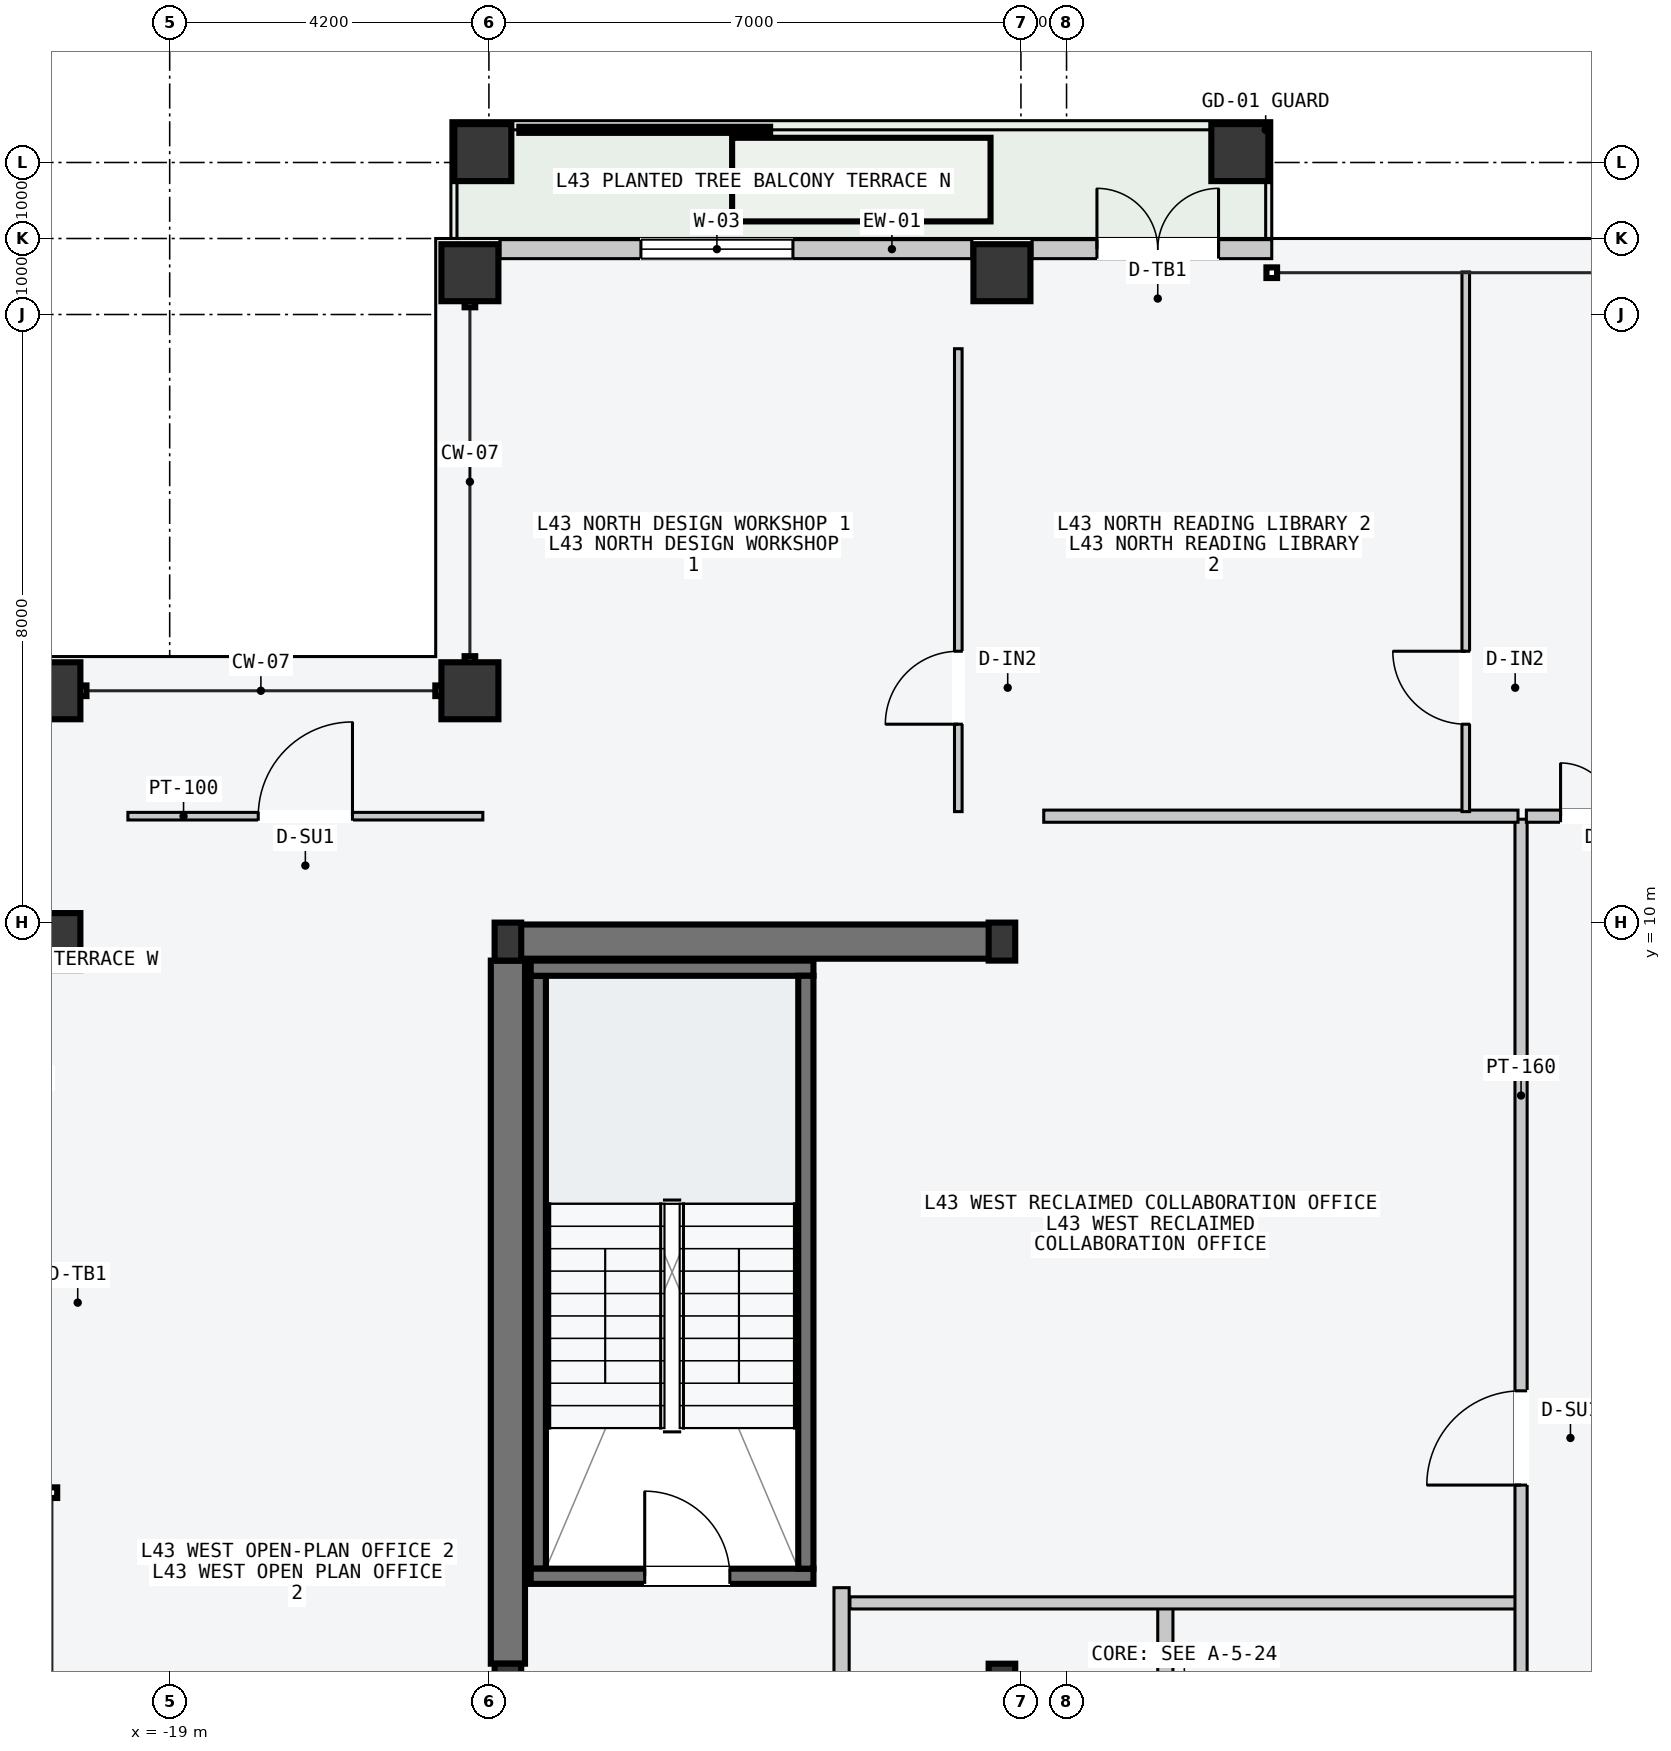
"""IFC4 building model, lengths in metres.
Left out: names, types, materials, properties, quantities, classifications, styles, units other than length and angle.
Written with IfcOpenShell. Run it as: python <this file> out.ifc"""

import sys

from ifc_helpers import new_model, si_unit, direction, frame, frame_2d, origin, origin_2d, place, context, subcontext, project, spatial, rectangle, hollow_rectangle, i_section, extrude, element, fill, save


model = new_model("IFC4")
c1 = context("Model", 3, precision=1e-05, world=origin(), true_north=direction((0.0, 1.0)))
c2 = subcontext(c1, "Body", "Model", "MODEL_VIEW")
j1 = project(units=[si_unit("LENGTHUNIT", "METRE"), si_unit("PLANEANGLEUNIT", "RADIAN")], contexts=[c1])
p1 = place(None, origin())
s1 = spatial("IfcSite", under=j1, at=p1, CompositionType="ELEMENT")
p2 = place(p1, origin())
s2 = spatial("IfcBuilding", under=s1, at=p2, CompositionType="ELEMENT")
p3 = place(p2, frame((0.0, 0.0, 165.9)))
s3 = spatial("IfcBuildingStorey", under=s2, at=p3, CompositionType="ELEMENT", Elevation=165.9)
p4 = place(p3, frame((-14.53, 9.75, -0.2), z_axis=(0.0, 0.0, 1.0), x_axis=(1.0, 0.0, 0.0)))
e1 = element("IfcWall", 1, at=p4, inside=s3, PredefinedType="SHEAR", context=c2, shape_type="SweptSolid", body=[
    extrude(rectangle(XDim=6.46, YDim=0.45, at=frame_2d((3.23, 0.0))), origin(), (0.0, 0.0, 1.0), 3.6),
])
p5 = place(p3, frame((-14.55, 0.25, -0.2), z_axis=(0.0, 0.0, 1.0), x_axis=(0.0, 1.0, 0.0)))
e2 = element("IfcWall", 2, at=p5, inside=s3, PredefinedType="SHEAR", context=c2, shape_type="SweptSolid", body=[
    extrude(rectangle(XDim=9.25, YDim=0.45, at=frame_2d((4.625, 0.0))), origin(), (0.0, 0.0, 1.0), 3.6),
])
p6 = place(p3, frame((-14.15, 1.5, -0.2), z_axis=(0.0, 0.0, 1.0), x_axis=(0.0, 1.0, 0.0)))
e3 = element("IfcWall", 3, at=p6, inside=s3, PredefinedType="SOLIDWALL", context=c2, shape_type="SweptSolid", body=[
    extrude(rectangle(XDim=7.8, YDim=0.2, at=frame_2d((3.9, 0.0))), origin(), (0.0, 0.0, 1.0), 3.6),
])
p7 = place(p3, frame((-14.25, 1.4, -0.2), z_axis=(0.0, 0.0, 1.0), x_axis=(1.0, 0.0, 0.0)))
e4 = element("IfcWall", 4, at=p7, inside=s3, PredefinedType="SOLIDWALL", context=c2, shape_type="SweptSolid", body=[
    extrude(rectangle(XDim=3.72, YDim=0.2, at=frame_2d((1.86, 0.0))), origin(), (0.0, 0.0, 1.0), 3.6),
])
p8 = place(p7, frame((1.5, 0.0, 0.2)))
e5 = element("IfcOpeningElement", 5, at=p8, cuts=e4, PredefinedType="OPENING", context=c2, shape_type="SweptSolid", body=[
    extrude(rectangle(XDim=1.12, YDim=2.18, at=frame_2d((0.56, 1.09))), frame((0.0, 0.11, 0.0), z_axis=(0.0, -1.0, 0.0), x_axis=(1.0, 0.0, 0.0)), (0.0, 0.0, 1.0), 0.22),
])
p9 = place(p3, frame((-14.25, 9.4, -0.2), z_axis=(0.0, 0.0, 1.0), x_axis=(1.0, 0.0, 0.0)))
e6 = element("IfcWall", 6, at=p9, inside=s3, PredefinedType="SOLIDWALL", context=c2, shape_type="SweptSolid", body=[
    extrude(rectangle(XDim=3.72, YDim=0.2, at=frame_2d((1.86, 0.0))), origin(), (0.0, 0.0, 1.0), 3.6),
])
p10 = place(p3, frame((-10.63, 1.5, -0.2), z_axis=(0.0, 0.0, 1.0), x_axis=(0.0, 1.0, 0.0)))
e7 = element("IfcWall", 7, at=p10, inside=s3, PredefinedType="SOLIDWALL", context=c2, shape_type="SweptSolid", body=[
    extrude(rectangle(XDim=7.8, YDim=0.2, at=frame_2d((3.9, 0.0))), origin(), (0.0, 0.0, 1.0), 3.6),
])
for number, where, z_axis, x_axis in (
    (8, (-14.55, 0.0, 0.0), (0.0, 0.0, 1.0), (1.0, 0.0, 0.0)),
    (9, (-14.55, 9.75, 0.0), (0.0, 0.0, 1.0), (1.0, 0.0, 0.0)),
    (10, (-8.05, 0.0, 0.0), (0.0, 0.0, 1.0), (1.0, 0.0, 0.0)),
    (11, (-8.05, 9.75, 0.0), (0.0, 0.0, 1.0), (1.0, 0.0, 0.0)),
):
    element("IfcColumn", number, at=place(p3, frame(where, z_axis=z_axis, x_axis=x_axis)), inside=s3, PredefinedType="COLUMN", context=c2, shape_type="SweptSolid", body=[
        extrude(i_section(OverallWidth=0.35, OverallDepth=0.5, WebThickness=0.02, FlangeThickness=0.032, at=origin_2d()), origin(), (0.0, 0.0, 1.0), 3.6),
    ])
for number, where, z_axis, x_axis in (
    (12, (-15.05, 18.55, 0.0), (0.0, 0.0, 1.0), (1.0, 0.0, 0.0)),
    (13, (-8.05, 18.55, 0.0), (0.0, 0.0, 1.0), (1.0, 0.0, 0.0)),
    (14, (-20.55, 9.75, 0.0), (0.0, 0.0, 1.0), (0.0, 1.0, 0.0)),
    (15, (-20.55, 13.05, 0.0), (0.0, 0.0, 1.0), (0.0, 1.0, 0.0)),
    (16, (-15.05, 13.05, 0.0), (0.0, 0.0, 1.0), (1.0, 0.0, 0.0)),
    (17, (-14.88, 20.13, 0.0), (0.0, 0.0, 1.0), (1.0, 0.0, 0.0)),
    (18, (-4.92, 20.13, 0.0), (0.0, 0.0, 1.0), (1.0, 0.0, 0.0)),
):
    element("IfcColumn", number, at=place(p3, frame(where, z_axis=z_axis, x_axis=x_axis)), inside=s3, PredefinedType="COLUMN", context=c2, shape_type="SweptSolid", body=[
        extrude(hollow_rectangle(XDim=0.75, YDim=0.75, WallThickness=0.032, at=origin_2d()), origin(), (0.0, 0.0, 1.0), 3.6),
    ])
p11 = place(p3, frame((-14.655, 18.86, 0.0), z_axis=(0.0, 0.0, 1.0), x_axis=(1.0, 0.0, 0.0)))
e19 = element("IfcWall", 19, at=p11, inside=s3, PredefinedType="STANDARD", context=c2, shape_type="SweptSolid", body=[
    extrude(rectangle(XDim=6.21, YDim=0.25, at=frame_2d((3.105, 0.0))), origin(), (0.0, 0.0, 1.0), 3.4),
])
p12 = place(p11, frame((1.855, 0.0, 0.85)))
e20 = element("IfcOpeningElement", 20, at=p12, cuts=e19, PredefinedType="OPENING", context=c2, shape_type="SweptSolid", body=[
    extrude(rectangle(XDim=2.0, YDim=2.1, at=frame_2d((1.0, 1.05))), frame((0.0, 0.135, 0.0), z_axis=(0.0, -1.0, 0.0), x_axis=(1.0, 0.0, 0.0)), (0.0, 0.0, 1.0), 0.27),
])
p13 = place(p3, frame((-7.655, 18.86, 0.0), z_axis=(0.0, 0.0, 1.0), x_axis=(1.0, 0.0, 0.0)))
e21 = element("IfcWall", 21, at=p13, inside=s3, PredefinedType="STANDARD", context=c2, shape_type="SweptSolid", body=[
    extrude(rectangle(XDim=3.155, YDim=0.25, at=frame_2d((1.578, 0.0))), origin(), (0.0, 0.0, 1.0), 3.4),
])
p14 = place(p13, frame((0.855, 0.0, 0.0)))
e22 = element("IfcOpeningElement", 22, at=p14, cuts=e21, PredefinedType="OPENING", context=c2, shape_type="SweptSolid", body=[
    extrude(rectangle(XDim=1.6, YDim=2.2, at=frame_2d((0.8, 1.1))), frame((0.0, 0.135, 0.0), z_axis=(0.0, -1.0, 0.0), x_axis=(1.0, 0.0, 0.0)), (0.0, 0.0, 1.0), 0.27),
])
p15 = place(p3, frame((-5.9, -9.45, 0.0), z_axis=(0.0, 0.0, 1.0), x_axis=(0.0, 1.0, 0.0)))
e23 = element("IfcWall", 23, at=p15, inside=s3, PredefinedType="PARTITIONING", context=c2, shape_type="SweptSolid", body=[
    extrude(rectangle(XDim=10.5, YDim=0.2, at=frame_2d((5.25, 0.0))), origin(), (0.0, 0.0, 1.0), 3.4),
])
p16 = place(p15, frame((3.9, 0.0, 0.0)))
e24 = element("IfcOpeningElement", 24, at=p16, cuts=e23, PredefinedType="OPENING", context=c2, shape_type="SweptSolid", body=[
    extrude(rectangle(XDim=1.5, YDim=2.2, at=frame_2d((0.75, 1.1))), frame((0.0, 0.11, 0.0), z_axis=(0.0, -1.0, 0.0), x_axis=(1.0, 0.0, 0.0)), (0.0, 0.0, 1.0), 0.22),
])
p17 = place(p3, frame((-10.16, -2.55, 0.0), z_axis=(0.0, 0.0, 1.0), x_axis=(0.0, 1.0, 0.0)))
e25 = element("IfcWall", 25, at=p17, inside=s3, PredefinedType="PARTITIONING", context=c2, shape_type="SweptSolid", body=[
    extrude(rectangle(XDim=3.8, YDim=0.2, at=frame_2d((1.9, 0.0))), origin(), (0.0, 0.0, 1.0), 3.4),
])
p18 = place(p17, frame((1.3, 0.0, 0.0)))
e26 = element("IfcOpeningElement", 26, at=p18, cuts=e25, PredefinedType="OPENING", context=c2, shape_type="SweptSolid", body=[
    extrude(rectangle(XDim=1.1, YDim=2.15, at=frame_2d((0.55, 1.075))), frame((0.0, 0.11, 0.0), z_axis=(0.0, -1.0, 0.0), x_axis=(1.0, 0.0, 0.0)), (0.0, 0.0, 1.0), 0.22),
])
p19 = place(p3, frame((-10.05, 1.05, 0.0), z_axis=(0.0, 0.0, 1.0), x_axis=(1.0, 0.0, 0.0)))
e27 = element("IfcWall", 27, at=p19, inside=s3, PredefinedType="PARTITIONING", context=c2, shape_type="SweptSolid", body=[
    extrude(rectangle(XDim=8.79, YDim=0.16, at=frame_2d((4.395, 0.0))), origin(), (0.0, 0.0, 1.0), 3.4),
])
p20 = place(p3, frame((-1.22, -3.5, 0.0), z_axis=(0.0, 0.0, 1.0), x_axis=(0.0, 1.0, 0.0)))
e28 = element("IfcWall", 28, at=p20, inside=s3, PredefinedType="PARTITIONING", context=c2, shape_type="SweptSolid", body=[
    extrude(rectangle(XDim=14.86, YDim=0.16, at=frame_2d((7.43, 0.0))), origin(), (0.0, 0.0, 1.0), 3.4),
])
p21 = place(p20, frame((6.1, 0.0, 0.0)))
e29 = element("IfcOpeningElement", 29, at=p21, cuts=e28, PredefinedType="OPENING", context=c2, shape_type="SweptSolid", body=[
    extrude(rectangle(XDim=1.24, YDim=2.24, at=frame_2d((0.62, 1.12))), frame((0.0, 0.09, 0.0), z_axis=(0.0, -1.0, 0.0), x_axis=(1.0, 0.0, 0.0)), (0.0, 0.0, 1.0), 0.18),
])
p22 = place(p20, frame((1.6, 0.0, 0.0)))
e30 = element("IfcOpeningElement", 30, at=p22, cuts=e28, PredefinedType="OPENING", context=c2, shape_type="SweptSolid", body=[
    extrude(rectangle(XDim=0.96, YDim=2.18, at=frame_2d((0.48, 1.09))), frame((0.0, 0.09, 0.0), z_axis=(0.0, -1.0, 0.0), x_axis=(1.0, 0.0, 0.0)), (0.0, 0.0, 1.0), 0.18),
])
p23 = place(p3, frame((-7.5, 11.4, 0.0), z_axis=(0.0, 0.0, 1.0), x_axis=(1.0, 0.0, 0.0)))
e31 = element("IfcWall", 31, at=p23, inside=s3, PredefinedType="PARTITIONING", context=c2, shape_type="SweptSolid", body=[
    extrude(rectangle(XDim=6.24, YDim=0.16, at=frame_2d((3.12, 0.0))), origin(), (0.0, 0.0, 1.0), 3.4),
])
p24 = place(p3, frame((-8.624, 11.46, 0.0), z_axis=(0.0, 0.0, 1.0), x_axis=(0.0, 1.0, 0.0)))
e32 = element("IfcWall", 32, at=p24, inside=s3, PredefinedType="PARTITIONING", context=c2, shape_type="SweptSolid", body=[
    extrude(rectangle(XDim=6.09, YDim=0.1, at=frame_2d((3.045, 0.0))), origin(), (0.0, 0.0, 1.0), 3.4),
])
p25 = place(p24, frame((1.15, 0.0, 0.0)))
e33 = element("IfcOpeningElement", 33, at=p25, cuts=e32, PredefinedType="OPENING", context=c2, shape_type="SweptSolid", body=[
    extrude(rectangle(XDim=0.96, YDim=2.18, at=frame_2d((0.48, 1.09))), frame((0.0, 0.06, 0.0), z_axis=(0.0, -1.0, 0.0), x_axis=(1.0, 0.0, 0.0)), (0.0, 0.0, 1.0), 0.12),
])
p26 = place(p3, frame((-1.948, 11.46, 0.0), z_axis=(0.0, 0.0, 1.0), x_axis=(0.0, 1.0, 0.0)))
e34 = element("IfcWall", 34, at=p26, inside=s3, PredefinedType="PARTITIONING", context=c2, shape_type="SweptSolid", body=[
    extrude(rectangle(XDim=7.1, YDim=0.1, at=frame_2d((3.55, 0.0))), origin(), (0.0, 0.0, 1.0), 3.4),
])
p27 = place(p26, frame((1.15, 0.0, 0.0)))
e35 = element("IfcOpeningElement", 35, at=p27, cuts=e34, PredefinedType="OPENING", context=c2, shape_type="SweptSolid", body=[
    extrude(rectangle(XDim=0.96, YDim=2.18, at=frame_2d((0.48, 1.09))), frame((0.0, 0.06, 0.0), z_axis=(0.0, -1.0, 0.0), x_axis=(1.0, 0.0, 0.0)), (0.0, 0.0, 1.0), 0.12),
])
p28 = place(p3, frame((-1.15, 11.4, 0.0), z_axis=(0.0, 0.0, 1.0), x_axis=(1.0, 0.0, 0.0)))
e36 = element("IfcWall", 36, at=p28, inside=s3, PredefinedType="PARTITIONING", context=c2, shape_type="SweptSolid", body=[
    extrude(rectangle(XDim=2.3, YDim=0.16, at=frame_2d((1.15, 0.0))), origin(), (0.0, 0.0, 1.0), 3.4),
])
p29 = place(p28, frame((0.45, 0.0, 0.0)))
e37 = element("IfcOpeningElement", 37, at=p29, cuts=e36, PredefinedType="OPENING", context=c2, shape_type="SweptSolid", body=[
    extrude(rectangle(XDim=1.4, YDim=2.2, at=frame_2d((0.7, 1.1))), frame((0.0, 0.09, 0.0), z_axis=(0.0, -1.0, 0.0), x_axis=(1.0, 0.0, 0.0)), (0.0, 0.0, 1.0), 0.18),
])
p30 = place(p3, frame((-19.55, 11.4, 0.0), z_axis=(0.0, 0.0, 1.0), x_axis=(1.0, 0.0, 0.0)))
e38 = element("IfcWall", 38, at=p30, inside=s3, PredefinedType="PARTITIONING", context=c2, shape_type="SweptSolid", body=[
    extrude(rectangle(XDim=4.67, YDim=0.1, at=frame_2d((2.335, 0.0))), origin(), (0.0, 0.0, 1.0), 3.4),
])
p31 = place(p30, frame((1.715, 0.0, 0.0)))
e39 = element("IfcOpeningElement", 39, at=p31, cuts=e38, PredefinedType="OPENING", context=c2, shape_type="SweptSolid", body=[
    extrude(rectangle(XDim=1.24, YDim=2.24, at=frame_2d((0.62, 1.12))), frame((0.0, 0.06, 0.0), z_axis=(0.0, -1.0, 0.0), x_axis=(1.0, 0.0, 0.0)), (0.0, 0.0, 1.0), 0.12),
])
p32 = place(p8, origin())
e40 = element("IfcDoor", 40, at=p32, inside=s3, OperationType="SINGLE_SWING_LEFT", PredefinedType="DOOR", context=c2, shape_type="SweptSolid", body=[
    extrude(rectangle(XDim=1.12, YDim=2.18, at=frame_2d((0.56, 1.09))), frame((0.0, 0.025, 0.0), z_axis=(0.0, -1.0, 0.0), x_axis=(1.0, 0.0, 0.0)), (0.0, 0.0, 1.0), 0.05),
])
fill(e5, e40)
p33 = place(p12, origin())
e41 = element("IfcWindow", 41, at=p33, inside=s3, PartitioningType="SINGLE_PANEL", PredefinedType="WINDOW", context=c2, shape_type="SweptSolid", body=[
    extrude(rectangle(XDim=2.0, YDim=2.1, at=frame_2d((1.0, 1.05))), frame((0.0, 0.03, 0.0), z_axis=(0.0, -1.0, 0.0), x_axis=(1.0, 0.0, 0.0)), (0.0, 0.0, 1.0), 0.06),
])
fill(e20, e41)
p34 = place(p14, origin())
e42 = element("IfcDoor", 42, at=p34, inside=s3, OperationType="DOUBLE_DOOR_SINGLE_SWING", PredefinedType="DOOR", context=c2, shape_type="SweptSolid", body=[
    extrude(rectangle(XDim=1.6, YDim=2.2, at=frame_2d((0.8, 1.1))), frame((0.0, 0.025, 0.0), z_axis=(0.0, -1.0, 0.0), x_axis=(1.0, 0.0, 0.0)), (0.0, 0.0, 1.0), 0.05),
])
fill(e22, e42)
p35 = place(p21, origin())
e43 = element("IfcDoor", 43, at=p35, inside=s3, OperationType="SINGLE_SWING_LEFT", PredefinedType="DOOR", context=c2, shape_type="SweptSolid", body=[
    extrude(rectangle(XDim=1.24, YDim=2.24, at=frame_2d((0.62, 1.12))), frame((0.0, 0.025, 0.0), z_axis=(0.0, -1.0, 0.0), x_axis=(1.0, 0.0, 0.0)), (0.0, 0.0, 1.0), 0.05),
])
fill(e29, e43)
p36 = place(p25, origin())
e44 = element("IfcDoor", 44, at=p36, inside=s3, OperationType="SINGLE_SWING_LEFT", PredefinedType="DOOR", context=c2, shape_type="SweptSolid", body=[
    extrude(rectangle(XDim=0.96, YDim=2.18, at=frame_2d((0.48, 1.09))), frame((0.0, 0.025, 0.0), z_axis=(0.0, -1.0, 0.0), x_axis=(1.0, 0.0, 0.0)), (0.0, 0.0, 1.0), 0.05),
])
fill(e33, e44)
p37 = place(p27, origin())
e45 = element("IfcDoor", 45, at=p37, inside=s3, OperationType="SINGLE_SWING_RIGHT", PredefinedType="DOOR", context=c2, shape_type="SweptSolid", body=[
    extrude(rectangle(XDim=0.96, YDim=2.18, at=frame_2d((0.48, 1.09))), frame((0.0, 0.025, 0.0), z_axis=(0.0, -1.0, 0.0), x_axis=(1.0, 0.0, 0.0)), (0.0, 0.0, 1.0), 0.05),
])
fill(e35, e45)
p38 = place(p29, origin())
e46 = element("IfcDoor", 46, at=p38, inside=s3, OperationType="DOUBLE_DOOR_SINGLE_SWING", PredefinedType="DOOR", context=c2, shape_type="SweptSolid", body=[
    extrude(rectangle(XDim=1.4, YDim=2.2, at=frame_2d((0.7, 1.1))), frame((0.0, 0.025, 0.0), z_axis=(0.0, -1.0, 0.0), x_axis=(1.0, 0.0, 0.0)), (0.0, 0.0, 1.0), 0.05),
])
fill(e37, e46)
p39 = place(p31, origin())
e47 = element("IfcDoor", 47, at=p39, inside=s3, OperationType="SINGLE_SWING_RIGHT", PredefinedType="DOOR", context=c2, shape_type="SweptSolid", body=[
    extrude(rectangle(XDim=1.24, YDim=2.24, at=frame_2d((0.62, 1.12))), frame((0.0, 0.025, 0.0), z_axis=(0.0, -1.0, 0.0), x_axis=(1.0, 0.0, 0.0)), (0.0, 0.0, 1.0), 0.05),
])
fill(e39, e47)
save(model, sys.argv[1])
